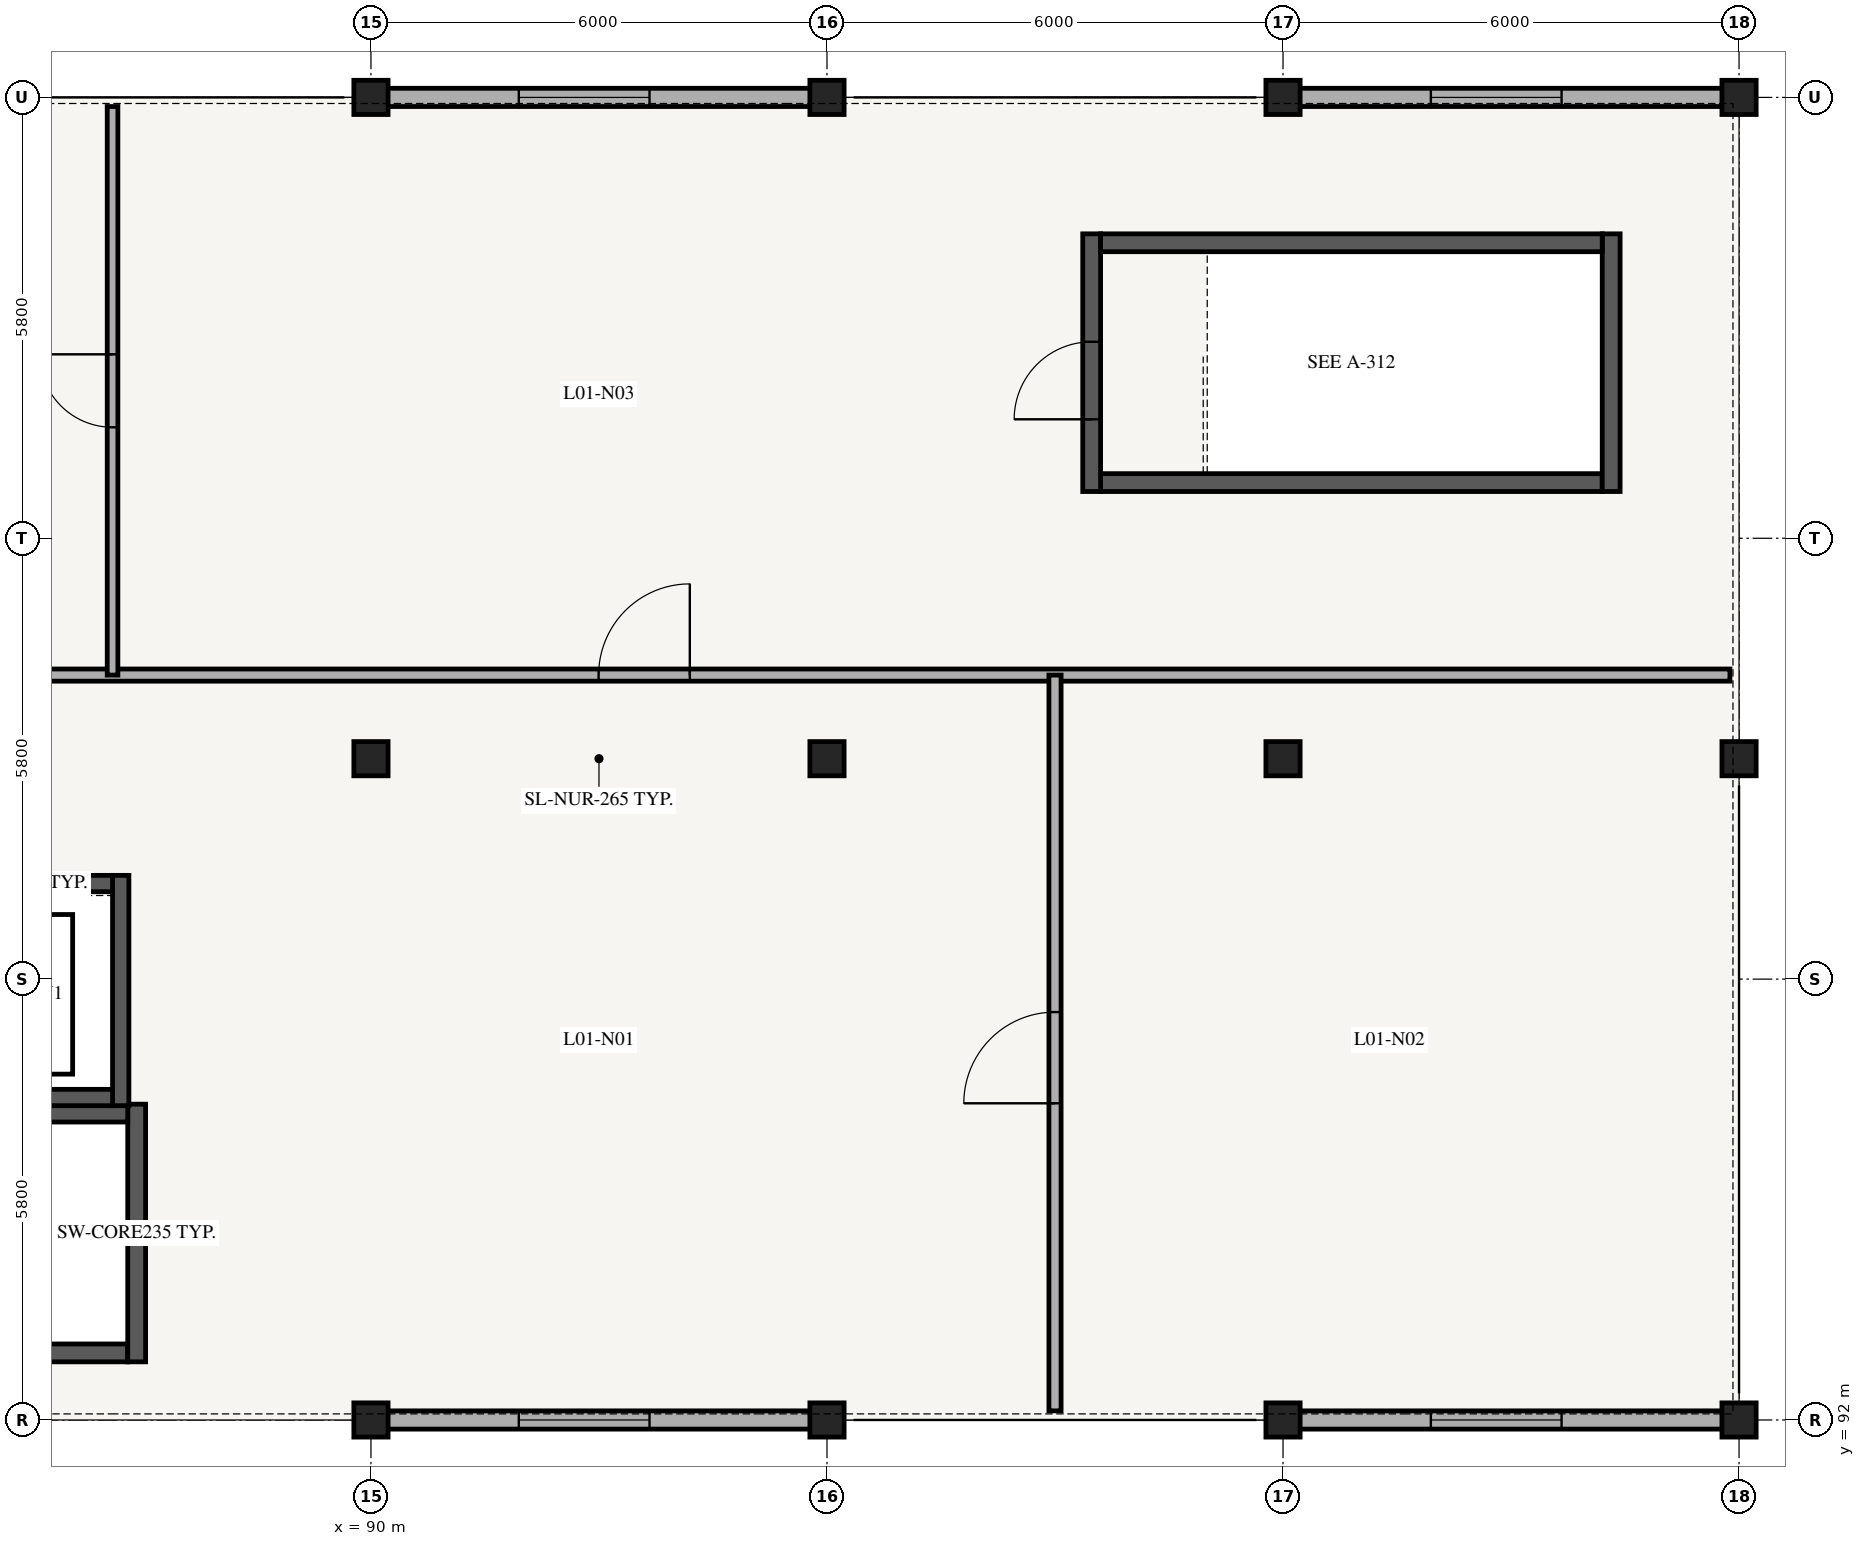
"""IFC4 building model, lengths in metres.
Left out: names, types, materials, properties, quantities, classifications, styles, units other than length and angle.
Written with IfcOpenShell. Run it as: python <this file> out.ifc"""

import sys

from ifc_helpers import new_model, si_unit, direction, frame, frame_2d, origin, origin_2d, place, context, subcontext, project, spatial, rectangle, extrude, element, fill, save


model = new_model("IFC4")
c1 = context("Model", 3, precision=1e-05, world=origin(), true_north=direction((0.0, 1.0)))
c2 = subcontext(c1, "Body", "Model", "MODEL_VIEW")
j1 = project(units=[si_unit("LENGTHUNIT", "METRE"), si_unit("PLANEANGLEUNIT", "RADIAN")], contexts=[c1])
p1 = place(None, origin())
s1 = spatial("IfcSite", under=j1, at=p1, CompositionType="ELEMENT")
p2 = place(p1, origin())
s2 = spatial("IfcBuilding", under=s1, at=p2, CompositionType="ELEMENT")
p3 = place(p2, frame((0.0, 0.0, 4.76)))
s3 = spatial("IfcBuildingStorey", under=s2, at=p3, CompositionType="ELEMENT", Elevation=4.76)
p4 = place(p3, frame((80.2, 92.883, 0.0), z_axis=(0.0, 0.0, 1.0), x_axis=(1.0, 0.0, 0.0)))
e1 = element("IfcWall", 1, at=p4, inside=s3, PredefinedType="SHEAR", context=c2, shape_type="SweptSolid", body=[
    extrude(rectangle(XDim=6.6, YDim=0.235, at=frame_2d((3.3, 0.0))), origin(), (0.0, 0.0, 1.0), 3.83),
])
p5 = place(p3, frame((86.917, 92.765, 0.0), z_axis=(0.0, 0.0, 1.0), x_axis=(0.0, 1.0, 0.0)))
e2 = element("IfcWall", 2, at=p5, inside=s3, PredefinedType="SHEAR", context=c2, shape_type="SweptSolid", body=[
    extrude(rectangle(XDim=3.39, YDim=0.235, at=frame_2d((1.695, 0.0))), origin(), (0.0, 0.0, 1.0), 3.83),
])
p6 = place(p3, frame((80.2, 96.038, 0.0), z_axis=(0.0, 0.0, 1.0), x_axis=(1.0, 0.0, 0.0)))
e3 = element("IfcWall", 3, at=p6, inside=s3, PredefinedType="SHEAR", context=c2, shape_type="SweptSolid", body=[
    extrude(rectangle(XDim=6.6, YDim=0.235, at=frame_2d((3.3, 0.0))), origin(), (0.0, 0.0, 1.0), 3.83),
])
p7 = place(p3, frame((86.708, 96.135, 0.0), z_axis=(0.0, 0.0, 1.0), x_axis=(0.0, 1.0, 0.0)))
e4 = element("IfcWall", 4, at=p7, inside=s3, PredefinedType="SHEAR", context=c2, shape_type="SweptSolid", body=[
    extrude(rectangle(XDim=3.03, YDim=0.215, at=frame_2d((1.515, 0.0))), origin(), (0.0, 0.0, 1.0), 3.83),
])
for number, where, z_axis, x_axis in (
    (5, (84.0, 96.242, 0.0), (0.0, 0.0, 1.0), (1.0, 0.0, 0.0)),
    (6, (84.0, 99.058, 0.0), (0.0, 0.0, 1.0), (1.0, 0.0, 0.0)),
):
    element("IfcWall", number, at=place(p3, frame(where, z_axis=z_axis, x_axis=x_axis)), inside=s3, PredefinedType="SHEAR", context=c2, shape_type="SweptSolid", body=[
        extrude(rectangle(XDim=2.6, YDim=0.215, at=frame_2d((1.3, 0.0))), origin(), (0.0, 0.0, 1.0), 3.83),
    ])
p8 = place(p3, frame((99.6, 104.333, 0.0), z_axis=(0.0, 0.0, 1.0), x_axis=(1.0, 0.0, 0.0)))
e7 = element("IfcWall", 7, at=p8, inside=s3, PredefinedType="SHEAR", context=c2, shape_type="SweptSolid", body=[
    extrude(rectangle(XDim=6.6, YDim=0.235, at=frame_2d((3.3, 0.0))), origin(), (0.0, 0.0, 1.0), 3.83),
])
p9 = place(p3, frame((106.317, 104.215, 0.0), z_axis=(0.0, 0.0, 1.0), x_axis=(0.0, 1.0, 0.0)))
e8 = element("IfcWall", 8, at=p9, inside=s3, PredefinedType="SHEAR", context=c2, shape_type="SweptSolid", body=[
    extrude(rectangle(XDim=3.39, YDim=0.235, at=frame_2d((1.695, 0.0))), origin(), (0.0, 0.0, 1.0), 3.83),
])
p10 = place(p3, frame((99.482, 104.215, 0.0), z_axis=(0.0, 0.0, 1.0), x_axis=(0.0, 1.0, 0.0)))
e9 = element("IfcWall", 9, at=p10, inside=s3, PredefinedType="SHEAR", context=c2, shape_type="SweptSolid", body=[
    extrude(rectangle(XDim=3.39, YDim=0.235, at=frame_2d((1.695, 0.0))), origin(), (0.0, 0.0, 1.0), 3.83),
])
p11 = place(p10, frame((0.95, 0.0, 0.0)))
e10 = element("IfcOpeningElement", 10, at=p11, cuts=e9, PredefinedType="OPENING", context=c2, shape_type="SweptSolid", body=[
    extrude(rectangle(XDim=1.02, YDim=2.14, at=frame_2d((0.51, 1.07))), frame((0.0, 0.127, 0.0), z_axis=(0.0, -1.0, 0.0), x_axis=(1.0, 0.0, 0.0)), (0.0, 0.0, 1.0), 0.255),
])
p12 = place(p3, frame((99.6, 107.488, 0.0), z_axis=(0.0, 0.0, 1.0), x_axis=(1.0, 0.0, 0.0)))
e11 = element("IfcWall", 11, at=p12, inside=s3, PredefinedType="SHEAR", context=c2, shape_type="SweptSolid", body=[
    extrude(rectangle(XDim=6.6, YDim=0.235, at=frame_2d((3.3, 0.0))), origin(), (0.0, 0.0, 1.0), 3.83),
])
for number, where, z_axis, x_axis in (
    (12, (90.0, 92.0, 0.0), (0.0, 0.0, 1.0), (1.0, 0.0, 0.0)),
    (13, (90.0, 100.7, 0.0), (0.0, 0.0, 1.0), (1.0, 0.0, 0.0)),
    (14, (90.0, 109.4, 0.0), (0.0, 0.0, 1.0), (1.0, 0.0, 0.0)),
    (15, (96.0, 92.0, 0.0), (0.0, 0.0, 1.0), (1.0, 0.0, 0.0)),
    (16, (96.0, 100.7, 0.0), (0.0, 0.0, 1.0), (1.0, 0.0, 0.0)),
    (17, (96.0, 109.4, 0.0), (0.0, 0.0, 1.0), (1.0, 0.0, 0.0)),
    (18, (102.0, 92.0, 0.0), (0.0, 0.0, 1.0), (1.0, 0.0, 0.0)),
    (19, (102.0, 100.7, 0.0), (0.0, 0.0, 1.0), (1.0, 0.0, 0.0)),
    (20, (102.0, 109.4, 0.0), (0.0, 0.0, 1.0), (1.0, 0.0, 0.0)),
    (21, (108.0, 92.0, 0.0), (0.0, 0.0, 1.0), (1.0, 0.0, 0.0)),
    (22, (108.0, 100.7, 0.0), (0.0, 0.0, 1.0), (1.0, 0.0, 0.0)),
    (23, (108.0, 109.4, 0.0), (0.0, 0.0, 1.0), (1.0, 0.0, 0.0)),
):
    element("IfcColumn", number, at=place(p3, frame(where, z_axis=z_axis, x_axis=x_axis)), inside=s3, PredefinedType="COLUMN", context=c2, shape_type="SweptSolid", body=[
        extrude(rectangle(XDim=0.45, YDim=0.45, at=origin_2d()), origin(), (0.0, 0.0, 1.0), 4.08),
    ])
p13 = place(p3, frame((90.195, 92.0, 0.0), z_axis=(0.0, 0.0, 1.0), x_axis=(1.0, 0.0, 0.0)))
e24 = element("IfcWall", 24, at=p13, inside=s3, PredefinedType="SOLIDWALL", context=c2, shape_type="SweptSolid", body=[
    extrude(rectangle(XDim=5.61, YDim=0.24, at=frame_2d((2.805, 0.0))), origin(), (0.0, 0.0, 1.0), 3.34),
])
p14 = place(p13, frame((1.75, 0.0, 0.65)))
e25 = element("IfcOpeningElement", 25, at=p14, cuts=e24, PredefinedType="OPENING", context=c2, shape_type="SweptSolid", body=[
    extrude(rectangle(XDim=1.72, YDim=1.64, at=frame_2d((0.86, 0.82))), frame((0.0, 0.13, 0.0), z_axis=(0.0, -1.0, 0.0), x_axis=(1.0, 0.0, 0.0)), (0.0, 0.0, 1.0), 0.26),
])
p15 = place(p3, frame((102.195, 92.0, 0.0), z_axis=(0.0, 0.0, 1.0), x_axis=(1.0, 0.0, 0.0)))
e26 = element("IfcWall", 26, at=p15, inside=s3, PredefinedType="SOLIDWALL", context=c2, shape_type="SweptSolid", body=[
    extrude(rectangle(XDim=5.61, YDim=0.24, at=frame_2d((2.805, 0.0))), origin(), (0.0, 0.0, 1.0), 3.34),
])
p16 = place(p15, frame((1.75, 0.0, 0.65)))
e27 = element("IfcOpeningElement", 27, at=p16, cuts=e26, PredefinedType="OPENING", context=c2, shape_type="SweptSolid", body=[
    extrude(rectangle(XDim=1.72, YDim=1.64, at=frame_2d((0.86, 0.82))), frame((0.0, 0.13, 0.0), z_axis=(0.0, -1.0, 0.0), x_axis=(1.0, 0.0, 0.0)), (0.0, 0.0, 1.0), 0.26),
])
p17 = place(p3, frame((90.195, 109.4, 0.0), z_axis=(0.0, 0.0, 1.0), x_axis=(1.0, 0.0, 0.0)))
e28 = element("IfcWall", 28, at=p17, inside=s3, PredefinedType="SOLIDWALL", context=c2, shape_type="SweptSolid", body=[
    extrude(rectangle(XDim=5.61, YDim=0.24, at=frame_2d((2.805, 0.0))), origin(), (0.0, 0.0, 1.0), 3.34),
])
p18 = place(p17, frame((1.75, 0.0, 0.65)))
e29 = element("IfcOpeningElement", 29, at=p18, cuts=e28, PredefinedType="OPENING", context=c2, shape_type="SweptSolid", body=[
    extrude(rectangle(XDim=1.72, YDim=1.64, at=frame_2d((0.86, 0.82))), frame((0.0, 0.13, 0.0), z_axis=(0.0, -1.0, 0.0), x_axis=(1.0, 0.0, 0.0)), (0.0, 0.0, 1.0), 0.26),
])
p19 = place(p3, frame((102.195, 109.4, 0.0), z_axis=(0.0, 0.0, 1.0), x_axis=(1.0, 0.0, 0.0)))
e30 = element("IfcWall", 30, at=p19, inside=s3, PredefinedType="SOLIDWALL", context=c2, shape_type="SweptSolid", body=[
    extrude(rectangle(XDim=5.61, YDim=0.24, at=frame_2d((2.805, 0.0))), origin(), (0.0, 0.0, 1.0), 3.34),
])
p20 = place(p19, frame((1.75, 0.0, 0.65)))
e31 = element("IfcOpeningElement", 31, at=p20, cuts=e30, PredefinedType="OPENING", context=c2, shape_type="SweptSolid", body=[
    extrude(rectangle(XDim=1.72, YDim=1.64, at=frame_2d((0.86, 0.82))), frame((0.0, 0.13, 0.0), z_axis=(0.0, -1.0, 0.0), x_axis=(1.0, 0.0, 0.0)), (0.0, 0.0, 1.0), 0.26),
])
p21 = place(p3, frame((78.12, 101.8, 0.0), z_axis=(0.0, 0.0, 1.0), x_axis=(1.0, 0.0, 0.0)))
e32 = element("IfcWall", 32, at=p21, inside=s3, PredefinedType="PARTITIONING", context=c2, shape_type="SweptSolid", body=[
    extrude(rectangle(XDim=29.76, YDim=0.16, at=frame_2d((14.88, 0.0))), origin(), (0.0, 0.0, 1.0), 2.86),
])
p22 = place(p21, frame((14.875, 0.0, 0.0)))
e33 = element("IfcOpeningElement", 33, at=p22, cuts=e32, PredefinedType="OPENING", context=c2, shape_type="SweptSolid", body=[
    extrude(rectangle(XDim=1.2, YDim=2.15, at=frame_2d((0.6, 1.075))), frame((0.0, 0.09, 0.0), z_axis=(0.0, -1.0, 0.0), x_axis=(1.0, 0.0, 0.0)), (0.0, 0.0, 1.0), 0.18),
])
p23 = place(p3, frame((99.0, 92.12, 0.0), z_axis=(0.0, 0.0, 1.0), x_axis=(0.0, 1.0, 0.0)))
e34 = element("IfcWall", 34, at=p23, inside=s3, PredefinedType="PARTITIONING", context=c2, shape_type="SweptSolid", body=[
    extrude(rectangle(XDim=9.68, YDim=0.16, at=frame_2d((4.84, 0.0))), origin(), (0.0, 0.0, 1.0), 2.86),
])
p24 = place(p23, frame((4.046, 0.0, 0.0)))
e35 = element("IfcOpeningElement", 35, at=p24, cuts=e34, PredefinedType="OPENING", context=c2, shape_type="SweptSolid", body=[
    extrude(rectangle(XDim=1.2, YDim=2.15, at=frame_2d((0.6, 1.075))), frame((0.0, 0.09, 0.0), z_axis=(0.0, -1.0, 0.0), x_axis=(1.0, 0.0, 0.0)), (0.0, 0.0, 1.0), 0.18),
])
p25 = place(p3, frame((86.6, 101.8, 0.0), z_axis=(0.0, 0.0, 1.0), x_axis=(0.0, 1.0, 0.0)))
e36 = element("IfcWall", 36, at=p25, inside=s3, PredefinedType="PLUMBINGWALL", context=c2, shape_type="SweptSolid", body=[
    extrude(rectangle(XDim=7.48, YDim=0.14, at=frame_2d((3.74, 0.0))), origin(), (0.0, 0.0, 1.0), 2.86),
])
p26 = place(p25, frame((3.26, 0.0, 0.0)))
e37 = element("IfcOpeningElement", 37, at=p26, cuts=e36, PredefinedType="OPENING", context=c2, shape_type="SweptSolid", body=[
    extrude(rectangle(XDim=0.96, YDim=2.1, at=frame_2d((0.48, 1.05))), frame((0.0, 0.08, 0.0), z_axis=(0.0, -1.0, 0.0), x_axis=(1.0, 0.0, 0.0)), (0.0, 0.0, 1.0), 0.16),
])
p27 = place(p14, origin())
e38 = element("IfcWindow", 38, at=p27, inside=s3, PartitioningType="SINGLE_PANEL", PredefinedType="WINDOW", context=c2, shape_type="SweptSolid", body=[
    extrude(rectangle(XDim=1.72, YDim=1.64, at=frame_2d((0.86, 0.82))), frame((0.0, 0.03, 0.0), z_axis=(0.0, -1.0, 0.0), x_axis=(1.0, 0.0, 0.0)), (0.0, 0.0, 1.0), 0.06),
])
fill(e25, e38)
p28 = place(p16, origin())
e39 = element("IfcWindow", 39, at=p28, inside=s3, PartitioningType="SINGLE_PANEL", PredefinedType="WINDOW", context=c2, shape_type="SweptSolid", body=[
    extrude(rectangle(XDim=1.72, YDim=1.64, at=frame_2d((0.86, 0.82))), frame((0.0, 0.03, 0.0), z_axis=(0.0, -1.0, 0.0), x_axis=(1.0, 0.0, 0.0)), (0.0, 0.0, 1.0), 0.06),
])
fill(e27, e39)
p29 = place(p18, origin())
e40 = element("IfcWindow", 40, at=p29, inside=s3, PartitioningType="SINGLE_PANEL", PredefinedType="WINDOW", context=c2, shape_type="SweptSolid", body=[
    extrude(rectangle(XDim=1.72, YDim=1.64, at=frame_2d((0.86, 0.82))), frame((0.0, 0.03, 0.0), z_axis=(0.0, -1.0, 0.0), x_axis=(1.0, 0.0, 0.0)), (0.0, 0.0, 1.0), 0.06),
])
fill(e29, e40)
p30 = place(p20, origin())
e41 = element("IfcWindow", 41, at=p30, inside=s3, PartitioningType="SINGLE_PANEL", PredefinedType="WINDOW", context=c2, shape_type="SweptSolid", body=[
    extrude(rectangle(XDim=1.72, YDim=1.64, at=frame_2d((0.86, 0.82))), frame((0.0, 0.03, 0.0), z_axis=(0.0, -1.0, 0.0), x_axis=(1.0, 0.0, 0.0)), (0.0, 0.0, 1.0), 0.06),
])
fill(e31, e41)
p31 = place(p11, origin())
e42 = element("IfcDoor", 42, at=p31, inside=s3, OperationType="SINGLE_SWING_LEFT", PredefinedType="DOOR", context=c2, shape_type="SweptSolid", body=[
    extrude(rectangle(XDim=1.02, YDim=2.14, at=frame_2d((0.51, 1.07))), frame((0.0, 0.025, 0.0), z_axis=(0.0, -1.0, 0.0), x_axis=(1.0, 0.0, 0.0)), (0.0, 0.0, 1.0), 0.05),
])
fill(e10, e42)
p32 = place(p22, origin())
e43 = element("IfcDoor", 43, at=p32, inside=s3, OperationType="SINGLE_SWING_RIGHT", PredefinedType="DOOR", context=c2, shape_type="SweptSolid", body=[
    extrude(rectangle(XDim=1.2, YDim=2.15, at=frame_2d((0.6, 1.075))), frame((0.0, 0.025, 0.0), z_axis=(0.0, -1.0, 0.0), x_axis=(1.0, 0.0, 0.0)), (0.0, 0.0, 1.0), 0.05),
])
fill(e33, e43)
p33 = place(p24, origin())
e44 = element("IfcDoor", 44, at=p33, inside=s3, OperationType="SINGLE_SWING_LEFT", PredefinedType="DOOR", context=c2, shape_type="SweptSolid", body=[
    extrude(rectangle(XDim=1.2, YDim=2.15, at=frame_2d((0.6, 1.075))), frame((0.0, 0.025, 0.0), z_axis=(0.0, -1.0, 0.0), x_axis=(1.0, 0.0, 0.0)), (0.0, 0.0, 1.0), 0.05),
])
fill(e35, e44)
p34 = place(p26, origin())
e45 = element("IfcDoor", 45, at=p34, inside=s3, OperationType="SINGLE_SWING_RIGHT", PredefinedType="DOOR", context=c2, shape_type="SweptSolid", body=[
    extrude(rectangle(XDim=0.96, YDim=2.1, at=frame_2d((0.48, 1.05))), frame((0.0, 0.025, 0.0), z_axis=(0.0, -1.0, 0.0), x_axis=(1.0, 0.0, 0.0)), (0.0, 0.0, 1.0), 0.05),
])
fill(e37, e45)
save(model, sys.argv[1])
